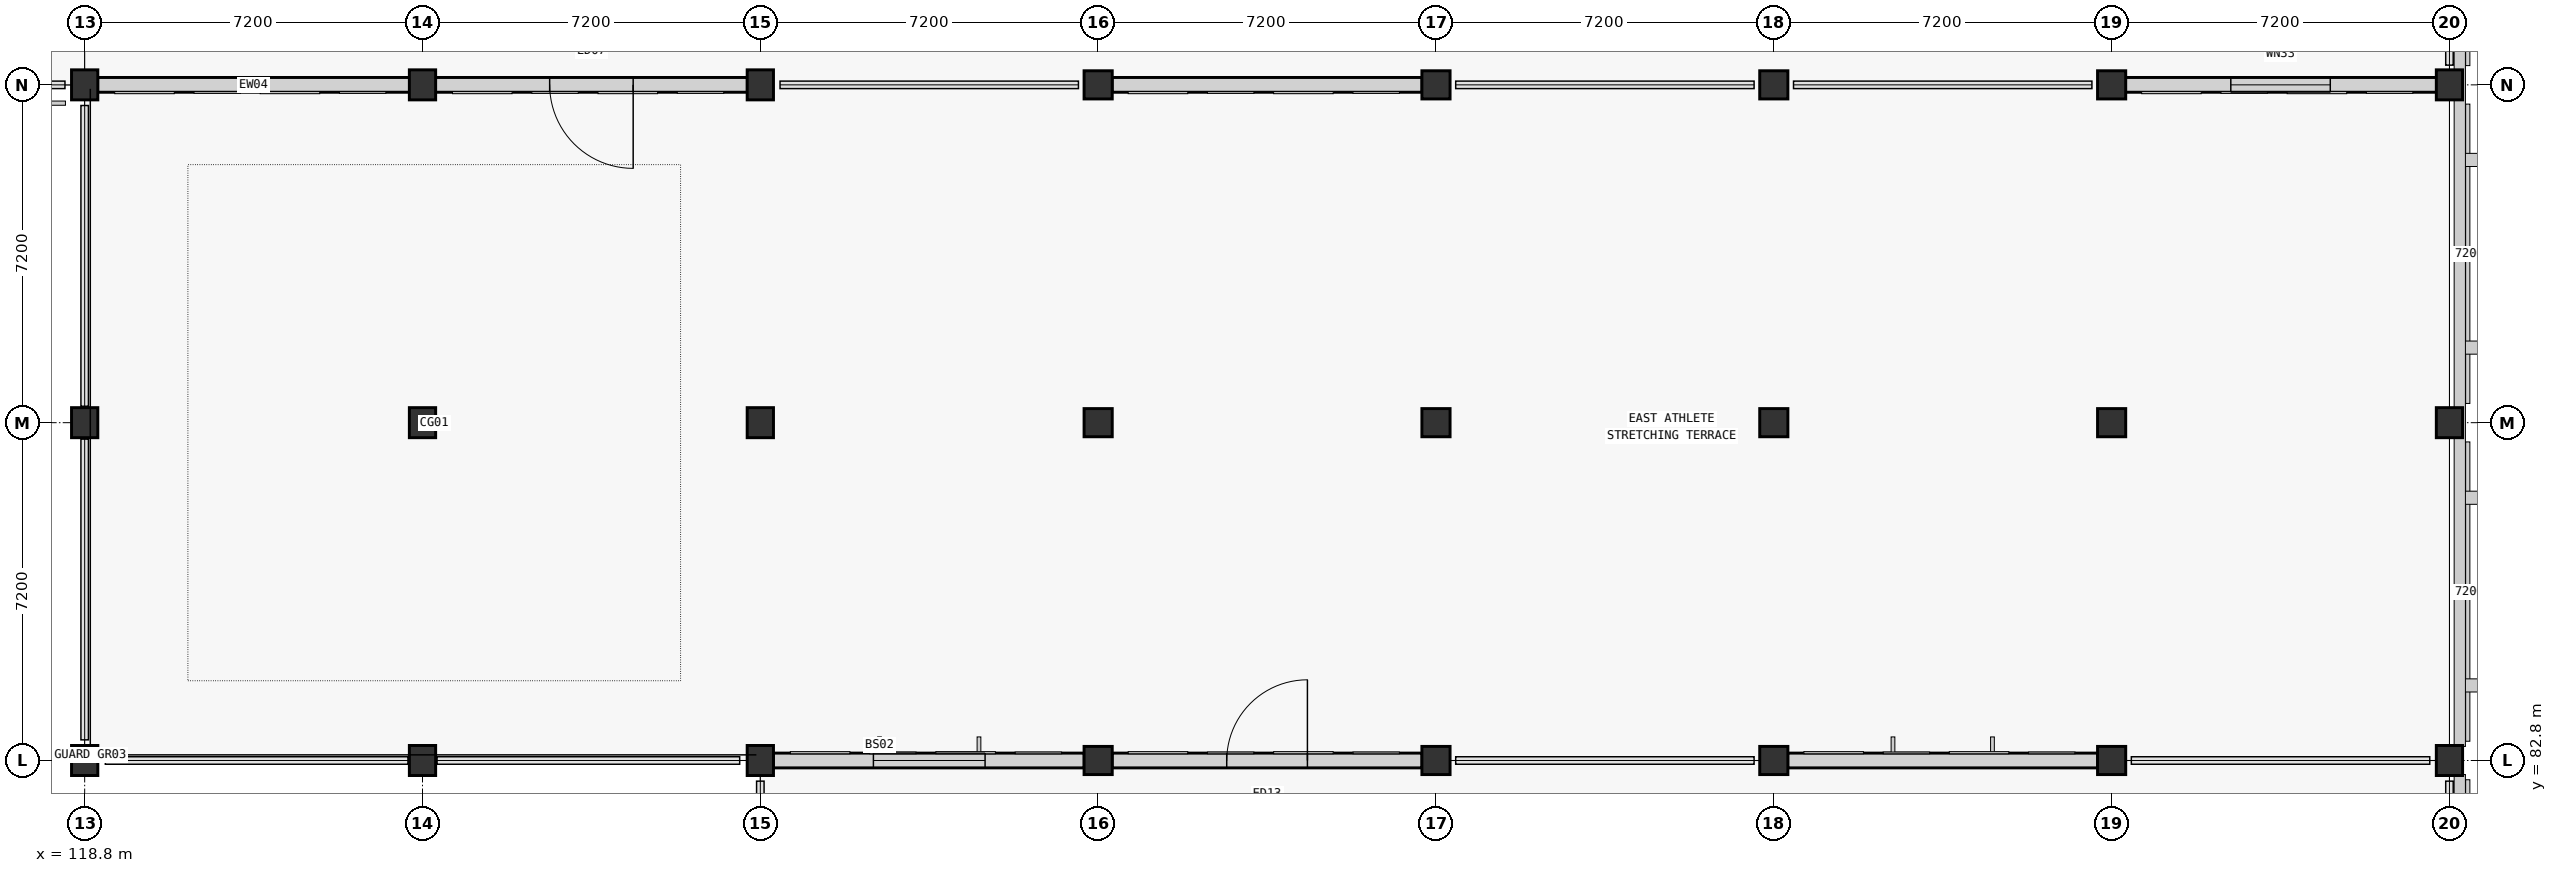
"""IFC4 building model, lengths in metres.
Left out: names, types, materials, properties, quantities, classifications, styles, units other than length and angle.
Written with IfcOpenShell. Run it as: python <this file> out.ifc"""

import sys

from ifc_helpers import new_model, si_unit, direction, frame, frame_2d, origin, origin_2d, place, context, subcontext, project, spatial, rectangle, extrude, element, fill, save


model = new_model("IFC4")
c1 = context("Model", 3, precision=1e-05, world=origin(), true_north=direction((0.0, 1.0)))
c2 = subcontext(c1, "Body", "Model", "MODEL_VIEW")
j1 = project(units=[si_unit("LENGTHUNIT", "METRE"), si_unit("PLANEANGLEUNIT", "RADIAN")], contexts=[c1])
p1 = place(None, origin())
s1 = spatial("IfcSite", under=j1, at=p1, CompositionType="ELEMENT")
p2 = place(p1, origin())
s2 = spatial("IfcBuilding", under=s1, at=p2, CompositionType="ELEMENT")
p3 = place(p2, frame((0.0, 0.0, 10.8)))
s3 = spatial("IfcBuildingStorey", under=s2, at=p3, CompositionType="ELEMENT", Elevation=10.8)
for number, where, z_axis, x_axis in (
    (1, (118.8, 82.8, 0.0), (0.0, 0.0, 1.0), (1.0, 0.0, 0.0)),
    (2, (118.8, 90.0, 0.0), (0.0, 0.0, 1.0), (1.0, 0.0, 0.0)),
    (3, (118.8, 97.2, 0.0), (0.0, 0.0, 1.0), (1.0, 0.0, 0.0)),
    (4, (126.0, 82.8, 0.0), (0.0, 0.0, 1.0), (1.0, 0.0, 0.0)),
    (5, (126.0, 90.0, 0.0), (0.0, 0.0, 1.0), (1.0, 0.0, 0.0)),
    (6, (126.0, 97.2, 0.0), (0.0, 0.0, 1.0), (1.0, 0.0, 0.0)),
    (7, (133.2, 82.8, 0.0), (0.0, 0.0, 1.0), (1.0, 0.0, 0.0)),
    (8, (133.2, 90.0, 0.0), (0.0, 0.0, 1.0), (1.0, 0.0, 0.0)),
    (9, (133.2, 97.2, 0.0), (0.0, 0.0, 1.0), (1.0, 0.0, 0.0)),
):
    element("IfcColumn", number, at=place(p3, frame(where, z_axis=z_axis, x_axis=x_axis)), inside=s3, PredefinedType="COLUMN", context=c2, shape_type="SweptSolid", body=[
        extrude(rectangle(XDim=0.56, YDim=0.64, at=origin_2d()), origin(), (0.0, 0.0, 1.0), 4.2),
    ])
for number, where, z_axis, x_axis in (
    (10, (140.4, 82.8, 0.0), (0.0, 0.0, 1.0), (1.0, 0.0, 0.0)),
    (11, (140.4, 90.0, 0.0), (0.0, 0.0, 1.0), (1.0, 0.0, 0.0)),
    (12, (140.4, 97.2, 0.0), (0.0, 0.0, 1.0), (1.0, 0.0, 0.0)),
    (13, (147.6, 82.8, 0.0), (0.0, 0.0, 1.0), (1.0, 0.0, 0.0)),
    (14, (147.6, 90.0, 0.0), (0.0, 0.0, 1.0), (1.0, 0.0, 0.0)),
    (15, (147.6, 97.2, 0.0), (0.0, 0.0, 1.0), (1.0, 0.0, 0.0)),
    (16, (154.8, 82.8, 0.0), (0.0, 0.0, 1.0), (1.0, 0.0, 0.0)),
    (17, (154.8, 90.0, 0.0), (0.0, 0.0, 1.0), (1.0, 0.0, 0.0)),
    (18, (154.8, 97.2, 0.0), (0.0, 0.0, 1.0), (1.0, 0.0, 0.0)),
    (19, (162.0, 82.8, 0.0), (0.0, 0.0, 1.0), (1.0, 0.0, 0.0)),
    (20, (162.0, 90.0, 0.0), (0.0, 0.0, 1.0), (1.0, 0.0, 0.0)),
    (21, (162.0, 97.2, 0.0), (0.0, 0.0, 1.0), (1.0, 0.0, 0.0)),
):
    element("IfcColumn", number, at=place(p3, frame(where, z_axis=z_axis, x_axis=x_axis)), inside=s3, PredefinedType="COLUMN", context=c2, shape_type="SweptSolid", body=[
        extrude(rectangle(XDim=0.6, YDim=0.6, at=origin_2d()), origin(), (0.0, 0.0, 1.0), 4.2),
    ])
for number, where, z_axis, x_axis in (
    (22, (169.2, 82.8, 0.0), (0.0, 0.0, 1.0), (1.0, 0.0, 0.0)),
    (23, (169.2, 90.0, 0.0), (0.0, 0.0, 1.0), (1.0, 0.0, 0.0)),
    (24, (169.2, 97.2, 0.0), (0.0, 0.0, 1.0), (1.0, 0.0, 0.0)),
):
    element("IfcColumn", number, at=place(p3, frame(where, z_axis=z_axis, x_axis=x_axis)), inside=s3, PredefinedType="COLUMN", context=c2, shape_type="SweptSolid", body=[
        extrude(rectangle(XDim=0.56, YDim=0.64, at=origin_2d()), origin(), (0.0, 0.0, 1.0), 4.2),
    ])
p4 = place(p3, frame((125.724, 97.2, 0.0), z_axis=(0.0, 0.0, 1.0), x_axis=(-1.0, 0.0, 0.0)))
e25 = element("IfcWall", 25, at=p4, inside=s3, PredefinedType="STANDARD", context=c2, shape_type="SweptSolid", body=[
    extrude(rectangle(XDim=6.648, YDim=0.315, at=frame_2d((3.324, 0.0))), origin(), (0.0, 0.0, 1.0), 3.24),
])
p5 = place(p3, frame((132.924, 97.2, 0.0), z_axis=(0.0, 0.0, 1.0), x_axis=(-1.0, 0.0, 0.0)))
e26 = element("IfcWall", 26, at=p5, inside=s3, PredefinedType="STANDARD", context=c2, shape_type="SweptSolid", body=[
    extrude(rectangle(XDim=6.648, YDim=0.315, at=frame_2d((3.324, 0.0))), origin(), (0.0, 0.0, 1.0), 3.24),
])
p6 = place(p5, frame((2.434, 0.0, 0.0)))
e27 = element("IfcOpeningElement", 27, at=p6, cuts=e26, PredefinedType="OPENING", context=c2, shape_type="SweptSolid", body=[
    extrude(rectangle(XDim=1.78, YDim=2.32, at=frame_2d((0.89, 1.16))), frame((0.0, 0.157, 0.0), z_axis=(0.0, -1.0, 0.0), x_axis=(1.0, 0.0, 0.0)), (0.0, 0.0, 1.0), 0.315),
])
p7 = place(p3, frame((147.304, 97.2, 0.0), z_axis=(0.0, 0.0, 1.0), x_axis=(-1.0, 0.0, 0.0)))
e28 = element("IfcWall", 28, at=p7, inside=s3, PredefinedType="STANDARD", context=c2, shape_type="SweptSolid", body=[
    extrude(rectangle(XDim=6.608, YDim=0.315, at=frame_2d((3.304, 0.0))), origin(), (0.0, 0.0, 1.0), 3.24),
])
p8 = place(p3, frame((168.924, 97.2, 0.0), z_axis=(0.0, 0.0, 1.0), x_axis=(-1.0, 0.0, 0.0)))
e29 = element("IfcWall", 29, at=p8, inside=s3, PredefinedType="STANDARD", context=c2, shape_type="SweptSolid", body=[
    extrude(rectangle(XDim=6.628, YDim=0.315, at=frame_2d((3.314, 0.0))), origin(), (0.0, 0.0, 1.0), 3.24),
])
p9 = place(p8, frame((2.264, 0.0, 0.9)))
e30 = element("IfcOpeningElement", 30, at=p9, cuts=e29, PredefinedType="OPENING", context=c2, shape_type="SweptSolid", body=[
    extrude(rectangle(XDim=2.12, YDim=1.56, at=frame_2d((1.06, 0.78))), frame((0.0, 0.157, 0.0), z_axis=(0.0, -1.0, 0.0), x_axis=(1.0, 0.0, 0.0)), (0.0, 0.0, 1.0), 0.315),
])
p10 = place(p3, frame((133.476, 82.8, 0.0), z_axis=(0.0, 0.0, 1.0), x_axis=(1.0, 0.0, 0.0)))
e31 = element("IfcWall", 31, at=p10, inside=s3, PredefinedType="STANDARD", context=c2, shape_type="SweptSolid", body=[
    extrude(rectangle(XDim=6.628, YDim=0.315, at=frame_2d((3.314, 0.0))), origin(), (0.0, 0.0, 1.0), 3.205),
])
p11 = place(p10, frame((2.134, 0.0, 0.9)))
e32 = element("IfcOpeningElement", 32, at=p11, cuts=e31, PredefinedType="OPENING", context=c2, shape_type="SweptSolid", body=[
    extrude(rectangle(XDim=2.38, YDim=1.42, at=frame_2d((1.19, 0.71))), frame((0.0, 0.157, 0.0), z_axis=(0.0, -1.0, 0.0), x_axis=(1.0, 0.0, 0.0)), (0.0, 0.0, 1.0), 0.315),
])
p12 = place(p3, frame((140.696, 82.8, 0.0), z_axis=(0.0, 0.0, 1.0), x_axis=(1.0, 0.0, 0.0)))
e33 = element("IfcWall", 33, at=p12, inside=s3, PredefinedType="STANDARD", context=c2, shape_type="SweptSolid", body=[
    extrude(rectangle(XDim=6.608, YDim=0.315, at=frame_2d((3.304, 0.0))), origin(), (0.0, 0.0, 1.0), 3.205),
])
p13 = place(p12, frame((2.444, 0.0, 0.0)))
e34 = element("IfcOpeningElement", 34, at=p13, cuts=e33, PredefinedType="OPENING", context=c2, shape_type="SweptSolid", body=[
    extrude(rectangle(XDim=1.72, YDim=2.28, at=frame_2d((0.86, 1.14))), frame((0.0, 0.157, 0.0), z_axis=(0.0, -1.0, 0.0), x_axis=(1.0, 0.0, 0.0)), (0.0, 0.0, 1.0), 0.315),
])
p14 = place(p3, frame((155.096, 82.8, 0.0), z_axis=(0.0, 0.0, 1.0), x_axis=(1.0, 0.0, 0.0)))
e35 = element("IfcWall", 35, at=p14, inside=s3, PredefinedType="STANDARD", context=c2, shape_type="SweptSolid", body=[
    extrude(rectangle(XDim=6.608, YDim=0.315, at=frame_2d((3.304, 0.0))), origin(), (0.0, 0.0, 1.0), 3.205),
])
p15 = place(p6, origin())
e36 = element("IfcDoor", 36, at=p15, inside=s3, OperationType="SINGLE_SWING_LEFT", PredefinedType="DOOR", context=c2, shape_type="SweptSolid", body=[
    extrude(rectangle(XDim=1.78, YDim=2.32, at=frame_2d((0.89, 1.16))), frame((0.0, 0.025, 0.0), z_axis=(0.0, -1.0, 0.0), x_axis=(1.0, 0.0, 0.0)), (0.0, 0.0, 1.0), 0.05),
])
fill(e27, e36)
p16 = place(p9, origin())
e37 = element("IfcWindow", 37, at=p16, inside=s3, PartitioningType="SINGLE_PANEL", PredefinedType="WINDOW", context=c2, shape_type="SweptSolid", body=[
    extrude(rectangle(XDim=2.12, YDim=1.56, at=frame_2d((1.06, 0.78))), frame((0.0, 0.03, 0.0), z_axis=(0.0, -1.0, 0.0), x_axis=(1.0, 0.0, 0.0)), (0.0, 0.0, 1.0), 0.06),
])
fill(e30, e37)
p17 = place(p11, origin())
e38 = element("IfcWindow", 38, at=p17, inside=s3, PartitioningType="SINGLE_PANEL", PredefinedType="WINDOW", context=c2, shape_type="SweptSolid", body=[
    extrude(rectangle(XDim=2.38, YDim=1.42, at=frame_2d((1.19, 0.71))), frame((0.0, 0.03, 0.0), z_axis=(0.0, -1.0, 0.0), x_axis=(1.0, 0.0, 0.0)), (0.0, 0.0, 1.0), 0.06),
])
fill(e32, e38)
p18 = place(p13, origin())
e39 = element("IfcDoor", 39, at=p18, inside=s3, OperationType="SINGLE_SWING_RIGHT", PredefinedType="DOOR", context=c2, shape_type="SweptSolid", body=[
    extrude(rectangle(XDim=1.72, YDim=2.28, at=frame_2d((0.86, 1.14))), frame((0.0, 0.025, 0.0), z_axis=(0.0, -1.0, 0.0), x_axis=(1.0, 0.0, 0.0)), (0.0, 0.0, 1.0), 0.05),
])
fill(e34, e39)
save(model, sys.argv[1])
